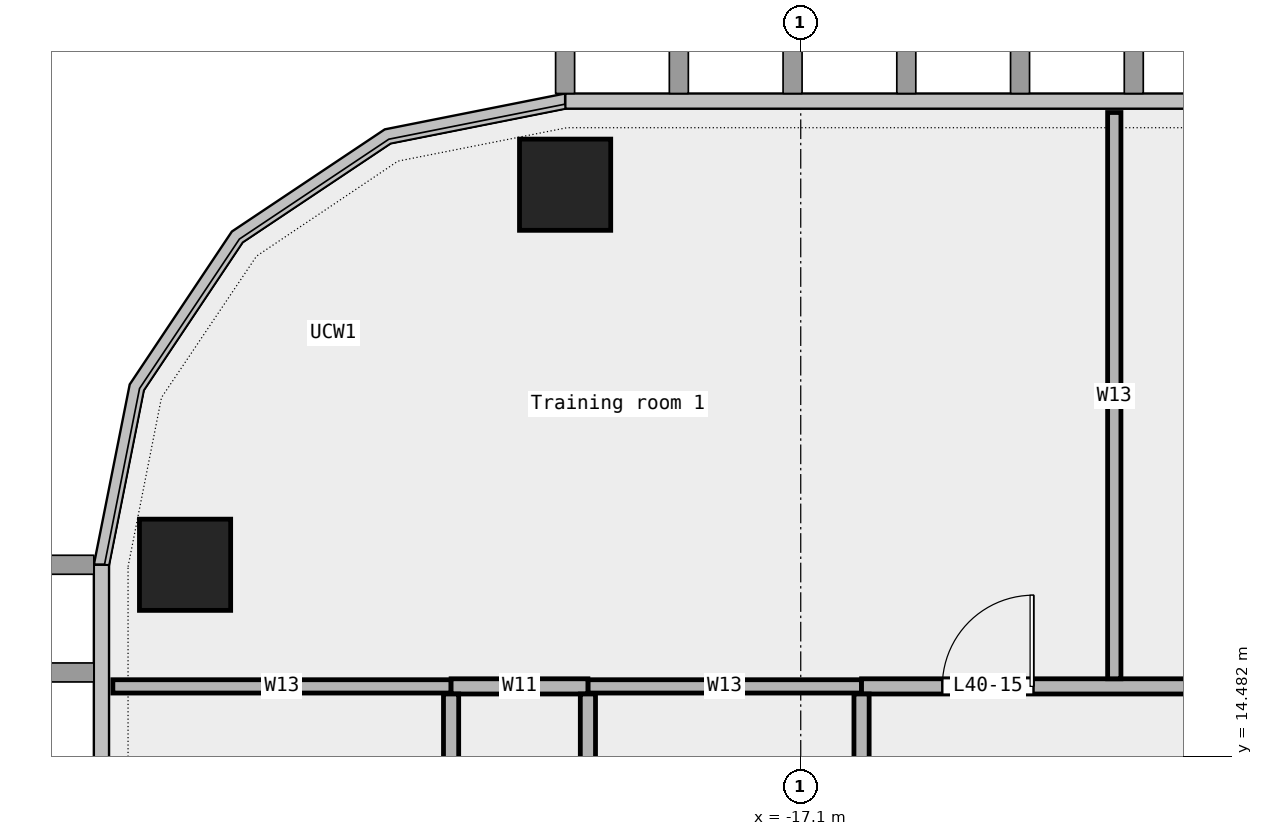
"""IFC4 building model, lengths in metres.
Left out: names, types, materials, properties, quantities, classifications, styles, units other than length and angle.
Written with IfcOpenShell. Run it as: python <this file> out.ifc"""

import sys

from ifc_helpers import new_model, si_unit, direction, frame, frame_2d, origin, origin_2d, place, context, subcontext, project, spatial, rectangle, extrude, element, fill, save


model = new_model("IFC4")
c1 = context("Model", 3, precision=1e-05, world=origin(), true_north=direction((0.0, 1.0)))
c2 = subcontext(c1, "Body", "Model", "MODEL_VIEW")
j1 = project(units=[si_unit("LENGTHUNIT", "METRE"), si_unit("PLANEANGLEUNIT", "RADIAN")], contexts=[c1])
p1 = place(None, origin())
s1 = spatial("IfcSite", under=j1, at=p1, CompositionType="ELEMENT")
p2 = place(p1, origin())
s2 = spatial("IfcBuilding", under=s1, at=p2, CompositionType="ELEMENT")
p3 = place(p2, frame((0.0, 0.0, 193.0)))
s3 = spatial("IfcBuildingStorey", under=s2, at=p3, CompositionType="ELEMENT", Elevation=193.0)
for number, where, z_axis, x_axis in (
    (1, (-20.2, 22.0, 0.0), (0.0, 0.0, 1.0), (1.0, 0.0, 0.0)),
    (2, (-25.2, 17.0, 0.0), (0.0, 0.0, 1.0), (1.0, 0.0, 0.0)),
):
    element("IfcColumn", number, at=place(p3, frame(where, z_axis=z_axis, x_axis=x_axis)), inside=s3, PredefinedType="COLUMN", context=c2, shape_type="SweptSolid", body=[
        extrude(rectangle(XDim=1.2, YDim=1.2, at=origin_2d()), origin(), (0.0, 0.0, 1.0), 3.6),
    ])
p4 = place(p3, frame((-26.15, 15.4, 0.0), z_axis=(0.0, 0.0, 1.0), x_axis=(1.0, 0.0, 0.0)))
e3 = element("IfcWall", 3, at=p4, inside=s3, PredefinedType="PARTITIONING", context=c2, shape_type="SweptSolid", body=[
    extrude(rectangle(XDim=4.45, YDim=0.175, at=frame_2d((2.225, 0.0))), origin(), (0.0, 0.0, 1.0), 3.6),
])
p5 = place(p3, frame((-19.9, 15.4, 0.0), z_axis=(0.0, 0.0, 1.0), x_axis=(1.0, 0.0, 0.0)))
e4 = element("IfcWall", 4, at=p5, inside=s3, PredefinedType="PARTITIONING", context=c2, shape_type="SweptSolid", body=[
    extrude(rectangle(XDim=3.6, YDim=0.175, at=frame_2d((1.8, 0.0))), origin(), (0.0, 0.0, 1.0), 3.6),
])
p6 = place(p3, frame((-21.7, 15.4, 0.0), z_axis=(0.0, 0.0, 1.0), x_axis=(1.0, 0.0, 0.0)))
e5 = element("IfcWall", 5, at=p6, inside=s3, PredefinedType="PARTITIONING", context=c2, shape_type="SweptSolid", body=[
    extrude(rectangle(XDim=1.8, YDim=0.2, at=frame_2d((0.9, 0.0))), origin(), (0.0, 0.0, 1.0), 3.6),
])
p7 = place(p3, frame((-16.3, 15.4, 0.0), z_axis=(0.0, 0.0, 1.0), x_axis=(1.0, 0.0, 0.0)))
e6 = element("IfcWall", 6, at=p7, inside=s3, PredefinedType="PARTITIONING", context=c2, shape_type="SweptSolid", body=[
    extrude(rectangle(XDim=32.6, YDim=0.2, at=frame_2d((16.3, 0.0))), origin(), (0.0, 0.0, 1.0), 3.6),
])
p8 = place(p7, frame((10.185, 0.0, 0.0)))
e7 = element("IfcOpeningElement", 7, at=p8, cuts=e6, PredefinedType="OPENING", context=c2, shape_type="SweptSolid", body=[
    extrude(rectangle(XDim=1.5, YDim=2.1, at=frame_2d((0.75, 1.05))), frame((0.0, 0.112, 0.0), z_axis=(0.0, -1.0, 0.0), x_axis=(1.0, 0.0, 0.0)), (0.0, 0.0, 1.0), 0.224),
])
p9 = place(p7, frame((1.062, 0.0, 0.0)))
e8 = element("IfcOpeningElement", 8, at=p9, cuts=e6, PredefinedType="OPENING", context=c2, shape_type="SweptSolid", body=[
    extrude(rectangle(XDim=1.2, YDim=2.1, at=frame_2d((0.6, 1.05))), frame((0.0, 0.112, 0.0), z_axis=(0.0, -1.0, 0.0), x_axis=(1.0, 0.0, 0.0)), (0.0, 0.0, 1.0), 0.224),
])
p10 = place(p7, frame((24.677, 0.0, 0.0)))
e9 = element("IfcOpeningElement", 9, at=p10, cuts=e6, PredefinedType="OPENING", context=c2, shape_type="SweptSolid", body=[
    extrude(rectangle(XDim=1.2, YDim=2.1, at=frame_2d((0.6, 1.05))), frame((0.0, 0.112, 0.0), z_axis=(0.0, -1.0, 0.0), x_axis=(1.0, 0.0, 0.0)), (0.0, 0.0, 1.0), 0.224),
])
p11 = place(p3, frame((-21.7, -9.0, 0.0), z_axis=(0.0, 0.0, 1.0), x_axis=(0.0, 1.0, 0.0)))
e10 = element("IfcWall", 10, at=p11, inside=s3, PredefinedType="PARTITIONING", context=c2, shape_type="SweptSolid", body=[
    extrude(rectangle(XDim=24.3, YDim=0.2, at=frame_2d((12.15, 0.0))), origin(), (0.0, 0.0, 1.0), 3.6),
])
p12 = place(p11, frame((18.305, 0.0, 0.0)))
e11 = element("IfcOpeningElement", 11, at=p12, cuts=e10, PredefinedType="OPENING", context=c2, shape_type="SweptSolid", body=[
    extrude(rectangle(XDim=1.2, YDim=2.1, at=frame_2d((0.6, 1.05))), frame((0.0, 0.112, 0.0), z_axis=(0.0, -1.0, 0.0), x_axis=(1.0, 0.0, 0.0)), (0.0, 0.0, 1.0), 0.224),
])
p13 = place(p11, frame((10.805, 0.0, 0.0)))
e12 = element("IfcOpeningElement", 12, at=p13, cuts=e10, PredefinedType="OPENING", context=c2, shape_type="SweptSolid", body=[
    extrude(rectangle(XDim=0.9, YDim=2.1, at=frame_2d((0.45, 1.05))), frame((0.0, 0.112, 0.0), z_axis=(0.0, -1.0, 0.0), x_axis=(1.0, 0.0, 0.0)), (0.0, 0.0, 1.0), 0.224),
])
p14 = place(p3, frame((-19.9, 2.95, 0.0), z_axis=(0.0, 0.0, 1.0), x_axis=(0.0, 1.0, 0.0)))
e13 = element("IfcWall", 13, at=p14, inside=s3, PredefinedType="PARTITIONING", context=c2, shape_type="SweptSolid", body=[
    extrude(rectangle(XDim=12.35, YDim=0.2, at=frame_2d((6.175, 0.0))), origin(), (0.0, 0.0, 1.0), 3.6),
])
p15 = place(p3, frame((-16.3, 11.7, 0.0), z_axis=(0.0, 0.0, 1.0), x_axis=(0.0, 1.0, 0.0)))
e14 = element("IfcWall", 14, at=p15, inside=s3, PredefinedType="PARTITIONING", context=c2, shape_type="SweptSolid", body=[
    extrude(rectangle(XDim=3.6, YDim=0.2, at=frame_2d((1.8, 0.0))), origin(), (0.0, 0.0, 1.0), 3.6),
])
p16 = place(p3, frame((-12.975, 15.5, 0.0), z_axis=(0.0, 0.0, 1.0), x_axis=(0.0, 1.0, 0.0)))
e15 = element("IfcWall", 15, at=p16, inside=s3, PredefinedType="PARTITIONING", context=c2, shape_type="SweptSolid", body=[
    extrude(rectangle(XDim=7.45, YDim=0.175, at=frame_2d((3.725, 0.0))), origin(), (0.0, 0.0, 1.0), 3.6),
])
p17 = place(p9, origin())
e16 = element("IfcDoor", 16, at=p17, inside=s3, OperationType="SINGLE_SWING_RIGHT", PredefinedType="DOOR", context=c2, shape_type="SweptSolid", body=[
    extrude(rectangle(XDim=1.2, YDim=2.1, at=frame_2d((0.6, 1.05))), frame((0.0, 0.025, 0.0), z_axis=(0.0, -1.0, 0.0), x_axis=(1.0, 0.0, 0.0)), (0.0, 0.0, 1.0), 0.05),
])
fill(e8, e16)
save(model, sys.argv[1])
